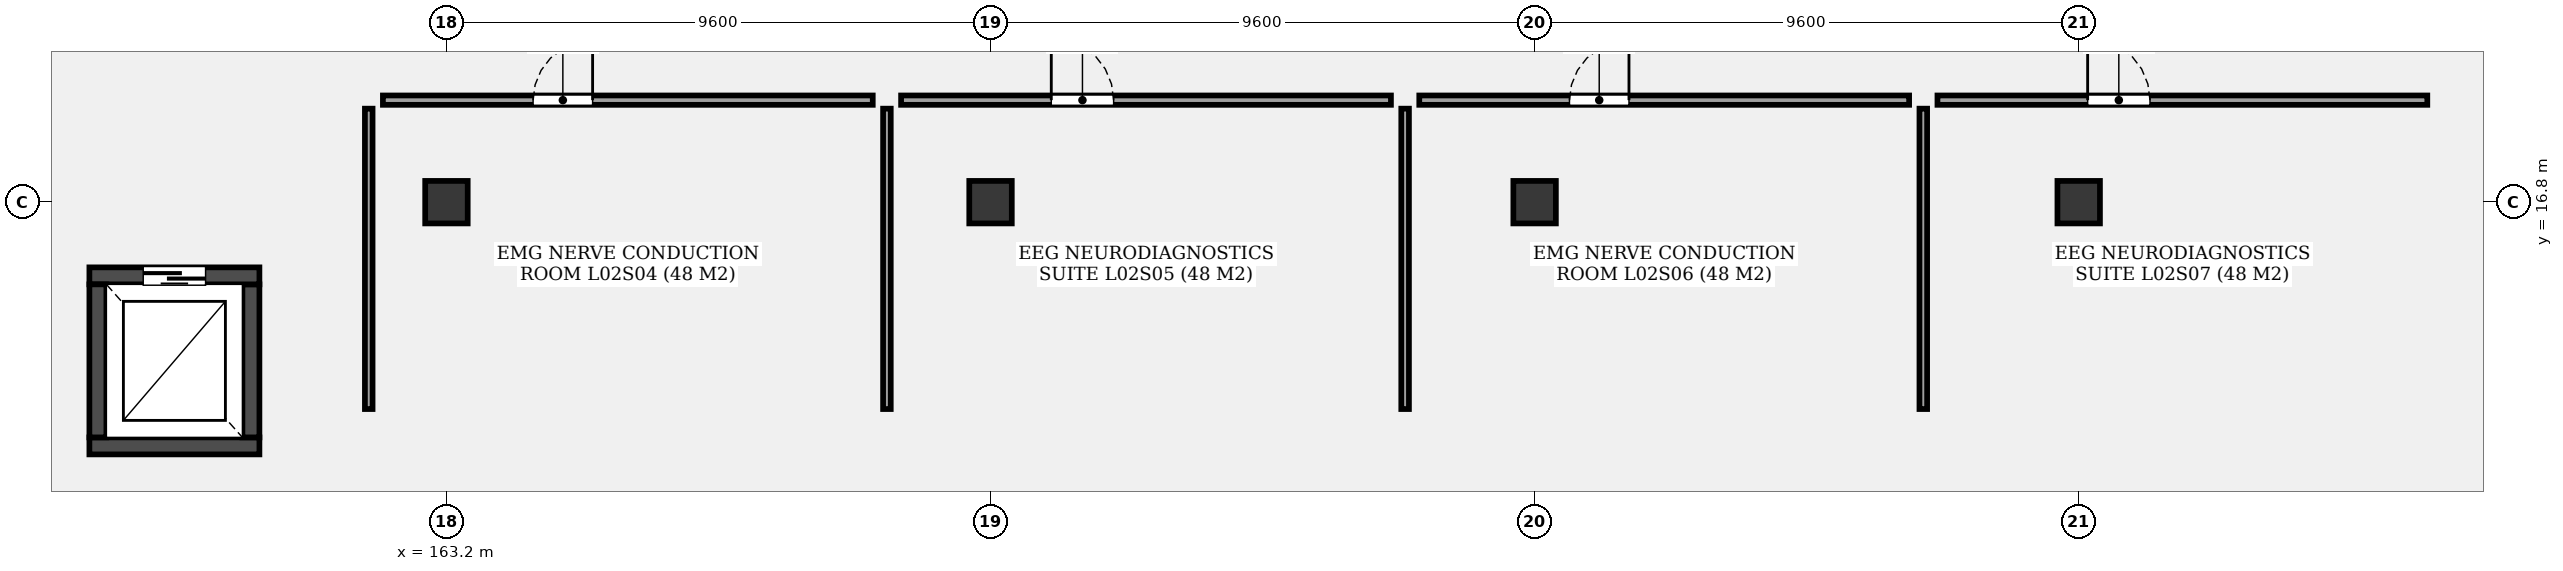
"""IFC4 building model, lengths in metres.
Left out: names, types, materials, properties, quantities, classifications, styles, units other than length and angle.
Written with IfcOpenShell. Run it as: python <this file> out.ifc"""

import sys

from ifc_helpers import new_model, si_unit, direction, frame, frame_2d, origin, origin_2d, place, context, subcontext, project, spatial, rectangle, extrude, element, fill, save


model = new_model("IFC4")
c1 = context("Model", 3, precision=1e-05, world=origin(), true_north=direction((0.0, 1.0)))
c2 = subcontext(c1, "Body", "Model", "MODEL_VIEW")
j1 = project(units=[si_unit("LENGTHUNIT", "METRE"), si_unit("PLANEANGLEUNIT", "RADIAN")], contexts=[c1])
p1 = place(None, origin())
s1 = spatial("IfcSite", under=j1, at=p1, CompositionType="ELEMENT")
p2 = place(p1, origin())
s2 = spatial("IfcBuilding", under=s1, at=p2, CompositionType="ELEMENT")
p3 = place(p2, frame((0.0, 0.0, 9.9)))
s3 = spatial("IfcBuildingStorey", under=s2, at=p3, CompositionType="ELEMENT", Elevation=9.9)
for number, where, z_axis, x_axis in (
    (1, (163.2, 16.8, 0.0), (0.0, 0.0, 1.0), (1.0, 0.0, 0.0)),
    (2, (172.8, 16.8, 0.0), (0.0, 0.0, 1.0), (1.0, 0.0, 0.0)),
    (3, (182.4, 16.8, 0.0), (0.0, 0.0, 1.0), (1.0, 0.0, 0.0)),
    (4, (192.0, 16.8, 0.0), (0.0, 0.0, 1.0), (1.0, 0.0, 0.0)),
):
    element("IfcColumn", number, at=place(p3, frame(where, z_axis=z_axis, x_axis=x_axis)), inside=s3, PredefinedType="COLUMN", context=c2, shape_type="SweptSolid", body=[
        extrude(rectangle(XDim=0.75, YDim=0.75, at=origin_2d()), origin(), (0.0, 0.0, 1.0), 3.6),
    ])
p4 = place(p3, frame((156.9, 12.5, 0.0), z_axis=(0.0, 0.0, 1.0), x_axis=(1.0, 0.0, 0.0)))
e5 = element("IfcWall", 5, at=p4, inside=s3, PredefinedType="SHEAR", context=c2, shape_type="SweptSolid", body=[
    extrude(rectangle(XDim=3.0, YDim=0.3, at=frame_2d((1.5, 0.0))), origin(), (0.0, 0.0, 1.0), 3.6),
])
p5 = place(p3, frame((159.75, 12.65, 0.0), z_axis=(0.0, 0.0, 1.0), x_axis=(0.0, 1.0, 0.0)))
e6 = element("IfcWall", 6, at=p5, inside=s3, PredefinedType="SHEAR", context=c2, shape_type="SweptSolid", body=[
    extrude(rectangle(XDim=2.7, YDim=0.3, at=frame_2d((1.35, 0.0))), origin(), (0.0, 0.0, 1.0), 3.6),
])
p6 = place(p3, frame((159.9, 15.5, 0.0), z_axis=(0.0, 0.0, 1.0), x_axis=(-1.0, 0.0, 0.0)))
e7 = element("IfcWall", 7, at=p6, inside=s3, PredefinedType="SHEAR", context=c2, shape_type="SweptSolid", body=[
    extrude(rectangle(XDim=3.0, YDim=0.3, at=frame_2d((1.5, 0.0))), origin(), (0.0, 0.0, 1.0), 3.6),
])
p7 = place(p6, frame((0.95, 0.0, 0.0)))
e8 = element("IfcOpeningElement", 8, at=p7, cuts=e7, PredefinedType="OPENING", context=c2, shape_type="SweptSolid", body=[
    extrude(rectangle(XDim=1.1, YDim=2.2, at=frame_2d((0.55, 1.1))), frame((0.0, 0.16, 0.0), z_axis=(0.0, -1.0, 0.0), x_axis=(1.0, 0.0, 0.0)), (0.0, 0.0, 1.0), 0.32),
])
p8 = place(p3, frame((157.05, 15.35, 0.0), z_axis=(0.0, 0.0, 1.0), x_axis=(0.0, -1.0, 0.0)))
e9 = element("IfcWall", 9, at=p8, inside=s3, PredefinedType="SHEAR", context=c2, shape_type="SweptSolid", body=[
    extrude(rectangle(XDim=2.7, YDim=0.3, at=frame_2d((1.35, 0.0))), origin(), (0.0, 0.0, 1.0), 3.6),
])
p9 = place(p3, frame((162.079, 18.6, 0.0), z_axis=(0.0, 0.0, 1.0), x_axis=(1.0, 0.0, 0.0)))
e10 = element("IfcWall", 10, at=p9, inside=s3, PredefinedType="PARTITIONING", context=c2, shape_type="SweptSolid", body=[
    extrude(rectangle(XDim=8.643, YDim=0.165, at=frame_2d((4.321, 0.0))), origin(), (0.0, 0.0, 1.0), 2.48),
])
p10 = place(p9, frame((2.65, 0.0, 0.0)))
e11 = element("IfcOpeningElement", 11, at=p10, cuts=e10, PredefinedType="OPENING", context=c2, shape_type="SweptSolid", body=[
    extrude(rectangle(XDim=1.05, YDim=2.1, at=frame_2d((0.525, 1.05))), frame((0.0, 0.093, 0.0), z_axis=(0.0, -1.0, 0.0), x_axis=(1.0, 0.0, 0.0)), (0.0, 0.0, 1.0), 0.185),
])
p11 = place(p3, frame((161.829, 13.15, 0.0), z_axis=(0.0, 0.0, 1.0), x_axis=(0.0, 1.0, 0.0)))
e12 = element("IfcWall", 12, at=p11, inside=s3, PredefinedType="PARTITIONING", context=c2, shape_type="SweptSolid", body=[
    extrude(rectangle(XDim=5.3, YDim=0.135, at=frame_2d((2.65, 0.0))), origin(), (0.0, 0.0, 1.0), 2.48),
])
p12 = place(p3, frame((171.222, 18.6, 0.0), z_axis=(0.0, 0.0, 1.0), x_axis=(1.0, 0.0, 0.0)))
e13 = element("IfcWall", 13, at=p12, inside=s3, PredefinedType="PARTITIONING", context=c2, shape_type="SweptSolid", body=[
    extrude(rectangle(XDim=8.643, YDim=0.165, at=frame_2d((4.322, 0.0))), origin(), (0.0, 0.0, 1.0), 2.48),
])
p13 = place(p12, frame((2.65, 0.0, 0.0)))
e14 = element("IfcOpeningElement", 14, at=p13, cuts=e13, PredefinedType="OPENING", context=c2, shape_type="SweptSolid", body=[
    extrude(rectangle(XDim=1.1, YDim=2.1, at=frame_2d((0.55, 1.05))), frame((0.0, 0.093, 0.0), z_axis=(0.0, -1.0, 0.0), x_axis=(1.0, 0.0, 0.0)), (0.0, 0.0, 1.0), 0.185),
])
p14 = place(p3, frame((170.972, 13.15, 0.0), z_axis=(0.0, 0.0, 1.0), x_axis=(0.0, 1.0, 0.0)))
e15 = element("IfcWall", 15, at=p14, inside=s3, PredefinedType="PARTITIONING", context=c2, shape_type="SweptSolid", body=[
    extrude(rectangle(XDim=5.3, YDim=0.135, at=frame_2d((2.65, 0.0))), origin(), (0.0, 0.0, 1.0), 2.48),
])
p15 = place(p3, frame((180.365, 18.6, 0.0), z_axis=(0.0, 0.0, 1.0), x_axis=(1.0, 0.0, 0.0)))
e16 = element("IfcWall", 16, at=p15, inside=s3, PredefinedType="PARTITIONING", context=c2, shape_type="SweptSolid", body=[
    extrude(rectangle(XDim=8.643, YDim=0.165, at=frame_2d((4.322, 0.0))), origin(), (0.0, 0.0, 1.0), 2.48),
])
p16 = place(p15, frame((2.65, 0.0, 0.0)))
e17 = element("IfcOpeningElement", 17, at=p16, cuts=e16, PredefinedType="OPENING", context=c2, shape_type="SweptSolid", body=[
    extrude(rectangle(XDim=1.05, YDim=2.1, at=frame_2d((0.525, 1.05))), frame((0.0, 0.093, 0.0), z_axis=(0.0, -1.0, 0.0), x_axis=(1.0, 0.0, 0.0)), (0.0, 0.0, 1.0), 0.185),
])
p17 = place(p3, frame((180.115, 13.15, 0.0), z_axis=(0.0, 0.0, 1.0), x_axis=(0.0, 1.0, 0.0)))
e18 = element("IfcWall", 18, at=p17, inside=s3, PredefinedType="PARTITIONING", context=c2, shape_type="SweptSolid", body=[
    extrude(rectangle(XDim=5.3, YDim=0.135, at=frame_2d((2.65, 0.0))), origin(), (0.0, 0.0, 1.0), 2.48),
])
p18 = place(p3, frame((189.508, 18.6, 0.0), z_axis=(0.0, 0.0, 1.0), x_axis=(1.0, 0.0, 0.0)))
e19 = element("IfcWall", 19, at=p18, inside=s3, PredefinedType="PARTITIONING", context=c2, shape_type="SweptSolid", body=[
    extrude(rectangle(XDim=8.643, YDim=0.165, at=frame_2d((4.321, 0.0))), origin(), (0.0, 0.0, 1.0), 2.48),
])
p19 = place(p18, frame((2.65, 0.0, 0.0)))
e20 = element("IfcOpeningElement", 20, at=p19, cuts=e19, PredefinedType="OPENING", context=c2, shape_type="SweptSolid", body=[
    extrude(rectangle(XDim=1.1, YDim=2.1, at=frame_2d((0.55, 1.05))), frame((0.0, 0.093, 0.0), z_axis=(0.0, -1.0, 0.0), x_axis=(1.0, 0.0, 0.0)), (0.0, 0.0, 1.0), 0.185),
])
p20 = place(p3, frame((189.258, 13.15, 0.0), z_axis=(0.0, 0.0, 1.0), x_axis=(0.0, 1.0, 0.0)))
e21 = element("IfcWall", 21, at=p20, inside=s3, PredefinedType="PARTITIONING", context=c2, shape_type="SweptSolid", body=[
    extrude(rectangle(XDim=5.3, YDim=0.135, at=frame_2d((2.65, 0.0))), origin(), (0.0, 0.0, 1.0), 2.48),
])
p21 = place(p7, origin())
e22 = element("IfcDoor", 22, at=p21, inside=s3, OperationType="SLIDING_TO_RIGHT", PredefinedType="DOOR", context=c2, shape_type="SweptSolid", body=[
    extrude(rectangle(XDim=1.1, YDim=2.2, at=frame_2d((0.55, 1.1))), frame((0.0, 0.025, 0.0), z_axis=(0.0, -1.0, 0.0), x_axis=(1.0, 0.0, 0.0)), (0.0, 0.0, 1.0), 0.05),
])
fill(e8, e22)
p22 = place(p10, origin())
e23 = element("IfcDoor", 23, at=p22, inside=s3, OperationType="SINGLE_SWING_RIGHT", PredefinedType="DOOR", context=c2, shape_type="SweptSolid", body=[
    extrude(rectangle(XDim=1.05, YDim=2.1, at=frame_2d((0.525, 1.05))), frame((0.0, 0.025, 0.0), z_axis=(0.0, -1.0, 0.0), x_axis=(1.0, 0.0, 0.0)), (0.0, 0.0, 1.0), 0.05),
])
fill(e11, e23)
p23 = place(p13, origin())
e24 = element("IfcDoor", 24, at=p23, inside=s3, OperationType="SINGLE_SWING_LEFT", PredefinedType="DOOR", context=c2, shape_type="SweptSolid", body=[
    extrude(rectangle(XDim=1.1, YDim=2.1, at=frame_2d((0.55, 1.05))), frame((0.0, 0.025, 0.0), z_axis=(0.0, -1.0, 0.0), x_axis=(1.0, 0.0, 0.0)), (0.0, 0.0, 1.0), 0.05),
])
fill(e14, e24)
p24 = place(p16, origin())
e25 = element("IfcDoor", 25, at=p24, inside=s3, OperationType="SINGLE_SWING_RIGHT", PredefinedType="DOOR", context=c2, shape_type="SweptSolid", body=[
    extrude(rectangle(XDim=1.05, YDim=2.1, at=frame_2d((0.525, 1.05))), frame((0.0, 0.025, 0.0), z_axis=(0.0, -1.0, 0.0), x_axis=(1.0, 0.0, 0.0)), (0.0, 0.0, 1.0), 0.05),
])
fill(e17, e25)
p25 = place(p19, origin())
e26 = element("IfcDoor", 26, at=p25, inside=s3, OperationType="SINGLE_SWING_LEFT", PredefinedType="DOOR", context=c2, shape_type="SweptSolid", body=[
    extrude(rectangle(XDim=1.1, YDim=2.1, at=frame_2d((0.55, 1.05))), frame((0.0, 0.025, 0.0), z_axis=(0.0, -1.0, 0.0), x_axis=(1.0, 0.0, 0.0)), (0.0, 0.0, 1.0), 0.05),
])
fill(e20, e26)
save(model, sys.argv[1])
